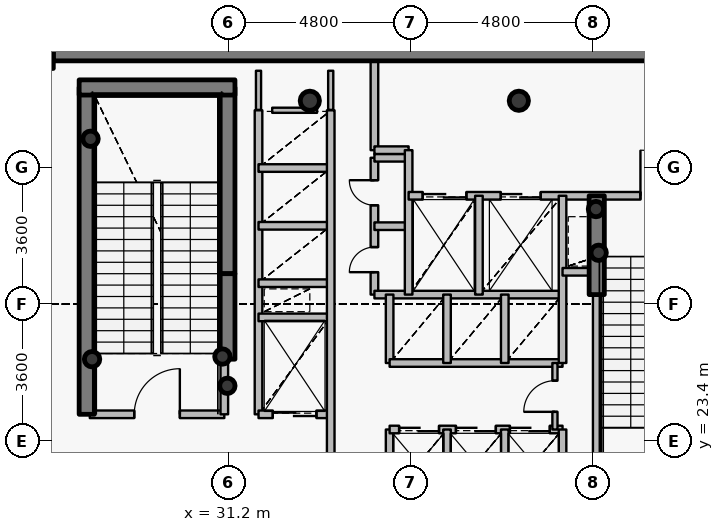
"""IFC4 building model, lengths in metres.
Left out: names, types, materials, properties, quantities, classifications, styles, units other than length and angle.
Written with IfcOpenShell. Run it as: python <this file> out.ifc"""

import sys

from ifc_helpers import new_model, si_unit, direction, frame, frame_2d, origin, origin_2d, place, context, subcontext, project, spatial, rectangle, hollow_circle, extrude, source, transform, mapped, element, fill, save


model = new_model("IFC4")
c1 = context("Model", 3, precision=1e-05, world=origin(), true_north=direction((0.0, 1.0)))
c2 = subcontext(c1, "Body", "Model", "MODEL_VIEW")
j1 = project(units=[si_unit("LENGTHUNIT", "METRE"), si_unit("PLANEANGLEUNIT", "RADIAN")], contexts=[c1])
p1 = place(None, origin())
s1 = spatial("IfcSite", under=j1, at=p1, CompositionType="ELEMENT")
p2 = place(p1, origin())
s2 = spatial("IfcBuilding", under=s1, at=p2, CompositionType="ELEMENT")
p3 = place(p2, frame((0.0, 0.0, 92.4)))
s3 = spatial("IfcBuildingStorey", under=s2, at=p3, CompositionType="ELEMENT", Elevation=92.4)
p4 = place(p3, frame((26.0, 33.8, 0.0), z_axis=(0.0, 0.0, 1.0), x_axis=(1.0, 0.0, 0.0)))
e1 = element("IfcColumn", 1, at=p4, inside=s3, PredefinedType="COLUMN", context=c2, shape_type="SweptSolid", body=[
    extrude(rectangle(XDim=1.2, YDim=1.2, at=origin_2d()), origin(), (0.0, 0.0, 1.0), 4.8),
])
for number, where, z_axis, x_axis in (
    (2, (38.85, 32.35, 0.0), (0.0, 0.0, 1.0), (1.0, 0.0, 0.0)),
    (3, (33.35, 32.35, 0.0), (0.0, 0.0, 1.0), (1.0, 0.0, 0.0)),
):
    element("IfcColumn", number, at=place(p3, frame(where, z_axis=z_axis, x_axis=x_axis)), inside=s3, PredefinedType="COLUMN", context=c2, shape_type="SweptSolid", body=[
        extrude(hollow_circle(Radius=0.254, WallThickness=0.02, at=origin_2d()), origin(), (0.0, 0.0, 1.0), 4.8),
    ])
p5 = place(p3, frame((27.48, 24.1, 0.0), z_axis=(0.0, 0.0, 1.0), x_axis=(0.0, 1.0, 0.0)))
e4 = element("IfcWall", 4, at=p5, inside=s3, PredefinedType="SHEAR", context=c2, shape_type="SweptSolid", body=[
    extrude(rectangle(XDim=8.6, YDim=0.4, at=frame_2d((4.3, 0.0))), origin(), (0.0, 0.0, 1.0), 4.8),
])
p6 = place(p3, frame((31.18, 27.8, 0.0), z_axis=(0.0, 0.0, 1.0), x_axis=(0.0, 1.0, 0.0)))
e5 = element("IfcWall", 5, at=p6, inside=s3, PredefinedType="SHEAR", context=c2, shape_type="SweptSolid", body=[
    extrude(rectangle(XDim=4.9, YDim=0.4, at=frame_2d((2.45, 0.0))), origin(), (0.0, 0.0, 1.0), 4.8),
])
p7 = place(p3, frame((27.28, 32.7, 0.0), z_axis=(0.0, 0.0, 1.0), x_axis=(1.0, 0.0, 0.0)))
e6 = element("IfcWall", 6, at=p7, inside=s3, PredefinedType="SHEAR", context=c2, shape_type="SweptSolid", body=[
    extrude(rectangle(XDim=4.1, YDim=0.4, at=frame_2d((2.05, 0.0))), origin(), (0.0, 0.0, 1.0), 4.8),
])
for number, where, z_axis, x_axis in (
    (7, (27.58, 31.35, 0.0), (0.0, 0.0, 1.0), (1.0, 0.0, 0.0)),
    (8, (31.05, 25.62, 0.0), (0.0, 0.0, 1.0), (1.0, 0.0, 0.0)),
    (9, (31.18, 24.85, 0.0), (0.0, 0.0, 1.0), (1.0, 0.0, 0.0)),
    (10, (27.62, 25.55, 0.0), (0.0, 0.0, 1.0), (1.0, 0.0, 0.0)),
    (11, (40.95, 28.35, 0.0), (0.0, 0.0, 1.0), (1.0, 0.0, 0.0)),
    (12, (40.88, 29.5, 0.0), (0.0, 0.0, 1.0), (1.0, 0.0, 0.0)),
):
    element("IfcColumn", number, at=place(p3, frame(where, z_axis=z_axis, x_axis=x_axis)), inside=s3, PredefinedType="COLUMN", context=c2, shape_type="SweptSolid", body=[
        extrude(hollow_circle(Radius=0.203, WallThickness=0.016, at=origin_2d()), origin(), (0.0, 0.0, 1.0), 4.8),
    ])
p8 = place(p3, frame((26.6, 33.8, 0.0), z_axis=(0.0, 0.0, 1.0), x_axis=(1.0, 0.0, 0.0)))
e13 = element("IfcWall", 13, at=p8, inside=s3, PredefinedType="SHEAR", context=c2, shape_type="SweptSolid", body=[
    extrude(rectangle(XDim=18.8, YDim=0.8, at=frame_2d((9.4, 0.0))), origin(), (0.0, 0.0, 1.0), 4.0),
])
p9 = place(p3, frame((31.18, 25.55, 0.0), z_axis=(0.0, 0.0, 1.0), x_axis=(0.0, 1.0, 0.0)))
e14 = element("IfcWall", 14, at=p9, inside=s3, PredefinedType="SHEAR", context=c2, shape_type="SweptSolid", body=[
    extrude(rectangle(XDim=2.25, YDim=0.4, at=frame_2d((1.125, 0.0))), origin(), (0.0, 0.0, 1.0), 4.15),
])
p10 = place(p3, frame((40.9, 27.25, 0.0), z_axis=(0.0, 0.0, 1.0), x_axis=(0.0, 1.0, 0.0)))
e15 = element("IfcWall", 15, at=p10, inside=s3, PredefinedType="SHEAR", context=c2, shape_type="SweptSolid", body=[
    extrude(rectangle(XDim=2.6, YDim=0.4, at=frame_2d((1.3, 0.0))), origin(), (0.0, 0.0, 1.0), 4.15),
])
p11 = place(p3, frame((27.56, 24.1, 0.0), z_axis=(0.0, 0.0, 1.0), x_axis=(1.0, 0.0, 0.0)))
e16 = element("IfcWall", 16, at=p11, inside=s3, PredefinedType="PARTITIONING", context=c2, shape_type="SweptSolid", body=[
    extrude(rectangle(XDim=3.54, YDim=0.2, at=frame_2d((1.77, 0.0))), origin(), (0.0, 0.0, 1.0), 4.55),
])
p12 = place(p11, frame((1.17, 0.0, 0.0)))
e17 = element("IfcOpeningElement", 17, at=p12, cuts=e16, PredefinedType="OPENING", context=c2, shape_type="SweptSolid", body=[
    extrude(rectangle(XDim=1.2, YDim=2.15, at=origin_2d()), frame((0.6, 0.11, 1.075), z_axis=(0.0, -1.0, 0.0), x_axis=(1.0, 0.0, 0.0)), (0.0, 0.0, 1.0), 0.22),
])
p13 = place(p3, frame((31.1, 24.1, 0.0), z_axis=(0.0, 0.0, 1.0), x_axis=(0.0, 1.0, 0.0)))
e18 = element("IfcWall", 18, at=p13, inside=s3, PredefinedType="PARTITIONING", context=c2, shape_type="SweptSolid", body=[
    extrude(rectangle(XDim=1.44, YDim=0.2, at=frame_2d((0.72, 0.0))), origin(), (0.0, 0.0, 1.0), 4.55),
])
p14 = place(p3, frame((32.0, 24.1, 0.0), z_axis=(0.0, 0.0, 1.0), x_axis=(0.0, 1.0, 0.0)))
e19 = element("IfcWall", 19, at=p14, inside=s3, PredefinedType="PARTITIONING", context=c2, shape_type="SweptSolid", body=[
    extrude(rectangle(XDim=8.0, YDim=0.2, at=frame_2d((4.0, 0.0))), origin(), (0.0, 0.0, 1.0), 4.55),
])
p15 = place(p3, frame((32.0, 24.1, 0.0), z_axis=(0.0, 0.0, 1.0), x_axis=(1.0, 0.0, 0.0)))
e20 = element("IfcWall", 20, at=p15, inside=s3, PredefinedType="PARTITIONING", context=c2, shape_type="SweptSolid", body=[
    extrude(rectangle(XDim=1.9, YDim=0.2, at=frame_2d((0.95, 0.0))), origin(), (0.0, 0.0, 1.0), 4.135),
])
p16 = place(p15, frame((0.375, 0.0, 0.0)))
e21 = element("IfcOpeningElement", 21, at=p16, cuts=e20, PredefinedType="OPENING", context=c2, shape_type="SweptSolid", body=[
    extrude(rectangle(XDim=1.15, YDim=2.15, at=origin_2d()), frame((0.575, 0.11, 1.075), z_axis=(0.0, -1.0, 0.0), x_axis=(1.0, 0.0, 0.0)), (0.0, 0.0, 1.0), 0.22),
])
for number, where, z_axis, x_axis in (
    (22, (32.0, 26.65, 0.0), (0.0, 0.0, 1.0), (1.0, 0.0, 0.0)),
    (23, (32.0, 27.55, 0.0), (0.0, 0.0, 1.0), (1.0, 0.0, 0.0)),
    (24, (32.0, 29.06, 0.0), (0.0, 0.0, 1.0), (1.0, 0.0, 0.0)),
    (25, (32.0, 30.58, 0.0), (0.0, 0.0, 1.0), (1.0, 0.0, 0.0)),
):
    element("IfcWall", number, at=place(p3, frame(where, z_axis=z_axis, x_axis=x_axis)), inside=s3, PredefinedType="PARTITIONING", context=c2, shape_type="SweptSolid", body=[
        extrude(rectangle(XDim=1.9, YDim=0.2, at=frame_2d((0.95, 0.0))), origin(), (0.0, 0.0, 1.0), 4.135),
    ])
p17 = place(p3, frame((33.9, 20.6, 0.0), z_axis=(0.0, 0.0, 1.0), x_axis=(0.0, 1.0, 0.0)))
e26 = element("IfcWall", 26, at=p17, inside=s3, PredefinedType="PARTITIONING", context=c2, shape_type="SweptSolid", body=[
    extrude(rectangle(XDim=11.5, YDim=0.2, at=frame_2d((5.75, 0.0))), origin(), (0.0, 0.0, 1.0), 4.135),
])
p18 = place(p3, frame((35.05, 27.25, 0.0), z_axis=(0.0, 0.0, 1.0), x_axis=(0.0, 1.0, 0.0)))
e27 = element("IfcWall", 27, at=p18, inside=s3, PredefinedType="PARTITIONING", context=c2, shape_type="SweptSolid", body=[
    extrude(rectangle(XDim=3.6, YDim=0.2, at=frame_2d((1.8, 0.0))), origin(), (0.0, 0.0, 1.0), 4.55),
])
p19 = place(p18, frame((0.59, 0.0, 0.0)))
e28 = element("IfcOpeningElement", 28, at=p19, cuts=e27, PredefinedType="OPENING", context=c2, shape_type="SweptSolid", body=[
    extrude(rectangle(XDim=0.66, YDim=2.05, at=origin_2d()), frame((0.33, 0.11, 1.025), z_axis=(0.0, -1.0, 0.0), x_axis=(1.0, 0.0, 0.0)), (0.0, 0.0, 1.0), 0.22),
])
p20 = place(p18, frame((2.35, 0.0, 0.0)))
e29 = element("IfcOpeningElement", 29, at=p20, cuts=e27, PredefinedType="OPENING", context=c2, shape_type="SweptSolid", body=[
    extrude(rectangle(XDim=0.66, YDim=2.05, at=origin_2d()), frame((0.33, 0.11, 1.025), z_axis=(0.0, -1.0, 0.0), x_axis=(1.0, 0.0, 0.0)), (0.0, 0.0, 1.0), 0.22),
])
p21 = place(p3, frame((35.05, 27.25, 0.0), z_axis=(0.0, 0.0, 1.0), x_axis=(1.0, 0.0, 0.0)))
e30 = element("IfcWall", 30, at=p21, inside=s3, PredefinedType="PARTITIONING", context=c2, shape_type="SweptSolid", body=[
    extrude(rectangle(XDim=4.95, YDim=0.2, at=frame_2d((2.475, 0.0))), origin(), (0.0, 0.0, 1.0), 4.135),
])
for number, where, z_axis, x_axis in (
    (31, (35.05, 29.05, 0.0), (0.0, 0.0, 1.0), (1.0, 0.0, 0.0)),
    (32, (35.05, 30.85, 0.0), (0.0, 0.0, 1.0), (1.0, 0.0, 0.0)),
):
    element("IfcWall", number, at=place(p3, frame(where, z_axis=z_axis, x_axis=x_axis)), inside=s3, PredefinedType="PARTITIONING", context=c2, shape_type="SweptSolid", body=[
        extrude(rectangle(XDim=0.9, YDim=0.2, at=frame_2d((0.45, 0.0))), origin(), (0.0, 0.0, 1.0), 4.55),
    ])
p22 = place(p3, frame((35.05, 31.05, 0.0), z_axis=(0.0, 0.0, 1.0), x_axis=(0.0, 1.0, 0.0)))
e33 = element("IfcWall", 33, at=p22, inside=s3, PredefinedType="PARTITIONING", context=c2, shape_type="SweptSolid", body=[
    extrude(rectangle(XDim=2.35, YDim=0.2, at=frame_2d((1.175, 0.0))), origin(), (0.0, 0.0, 1.0), 4.135),
])
p23 = place(p3, frame((35.05, 31.05, 0.0), z_axis=(0.0, 0.0, 1.0), x_axis=(1.0, 0.0, 0.0)))
e34 = element("IfcWall", 34, at=p23, inside=s3, PredefinedType="PARTITIONING", context=c2, shape_type="SweptSolid", body=[
    extrude(rectangle(XDim=0.9, YDim=0.2, at=frame_2d((0.45, 0.0))), origin(), (0.0, 0.0, 1.0), 4.55),
])
p24 = place(p3, frame((35.45, 21.9, 0.0), z_axis=(0.0, 0.0, 1.0), x_axis=(0.0, 1.0, 0.0)))
e35 = element("IfcWall", 35, at=p24, inside=s3, PredefinedType="PARTITIONING", context=c2, shape_type="SweptSolid", body=[
    extrude(rectangle(XDim=1.8, YDim=0.2, at=frame_2d((0.9, 0.0))), origin(), (0.0, 0.0, 1.0), 4.55),
])
p25 = place(p3, frame((35.45, 23.7, 0.0), z_axis=(0.0, 0.0, 1.0), x_axis=(1.0, 0.0, 0.0)))
e36 = element("IfcWall", 36, at=p25, inside=s3, PredefinedType="PARTITIONING", context=c2, shape_type="SweptSolid", body=[
    extrude(rectangle(XDim=4.55, YDim=0.2, at=frame_2d((2.275, 0.0))), origin(), (0.0, 0.0, 1.0), 4.135),
])
p26 = place(p25, frame((0.25, 0.0, 0.0)))
e37 = element("IfcOpeningElement", 37, at=p26, cuts=e36, PredefinedType="OPENING", context=c2, shape_type="SweptSolid", body=[
    extrude(rectangle(XDim=1.05, YDim=2.15, at=origin_2d()), frame((0.525, 0.11, 1.075), z_axis=(0.0, -1.0, 0.0), x_axis=(1.0, 0.0, 0.0)), (0.0, 0.0, 1.0), 0.22),
])
p27 = place(p25, frame((1.745, 0.0, 0.0)))
e38 = element("IfcOpeningElement", 38, at=p27, cuts=e36, PredefinedType="OPENING", context=c2, shape_type="SweptSolid", body=[
    extrude(rectangle(XDim=1.05, YDim=2.15, at=origin_2d()), frame((0.525, 0.11, 1.075), z_axis=(0.0, -1.0, 0.0), x_axis=(1.0, 0.0, 0.0)), (0.0, 0.0, 1.0), 0.22),
])
p28 = place(p25, frame((3.165, 0.0, 0.0)))
e39 = element("IfcOpeningElement", 39, at=p28, cuts=e36, PredefinedType="OPENING", context=c2, shape_type="SweptSolid", body=[
    extrude(rectangle(XDim=1.05, YDim=2.15, at=origin_2d()), frame((0.525, 0.11, 1.075), z_axis=(0.0, -1.0, 0.0), x_axis=(1.0, 0.0, 0.0)), (0.0, 0.0, 1.0), 0.22),
])
p29 = place(p3, frame((35.45, 25.45, 0.0), z_axis=(0.0, 0.0, 1.0), x_axis=(0.0, 1.0, 0.0)))
e40 = element("IfcWall", 40, at=p29, inside=s3, PredefinedType="PARTITIONING", context=c2, shape_type="SweptSolid", body=[
    extrude(rectangle(XDim=1.8, YDim=0.2, at=frame_2d((0.9, 0.0))), origin(), (0.0, 0.0, 1.0), 4.55),
])
p30 = place(p3, frame((35.45, 25.45, 0.0), z_axis=(0.0, 0.0, 1.0), x_axis=(1.0, 0.0, 0.0)))
e41 = element("IfcWall", 41, at=p30, inside=s3, PredefinedType="PARTITIONING", context=c2, shape_type="SweptSolid", body=[
    extrude(rectangle(XDim=4.55, YDim=0.2, at=frame_2d((2.275, 0.0))), origin(), (0.0, 0.0, 1.0), 4.135),
])
p31 = place(p3, frame((35.95, 27.25, 0.0), z_axis=(0.0, 0.0, 1.0), x_axis=(0.0, 1.0, 0.0)))
e42 = element("IfcWall", 42, at=p31, inside=s3, PredefinedType="PARTITIONING", context=c2, shape_type="SweptSolid", body=[
    extrude(rectangle(XDim=3.8, YDim=0.2, at=frame_2d((1.9, 0.0))), origin(), (0.0, 0.0, 1.0), 4.55),
])
p32 = place(p3, frame((35.95, 29.85, 0.0), z_axis=(0.0, 0.0, 1.0), x_axis=(1.0, 0.0, 0.0)))
e43 = element("IfcWall", 43, at=p32, inside=s3, PredefinedType="PARTITIONING", context=c2, shape_type="SweptSolid", body=[
    extrude(rectangle(XDim=8.49, YDim=0.2, at=frame_2d((4.245, 0.0))), origin(), (0.0, 0.0, 1.0), 4.135),
])
p33 = place(p32, frame((6.1, 0.0, 0.0)))
e44 = element("IfcOpeningElement", 44, at=p33, cuts=e43, PredefinedType="OPENING", context=c2, shape_type="SweptSolid", body=[
    extrude(rectangle(XDim=1.2, YDim=2.15, at=origin_2d()), frame((0.6, 0.11, 1.075), z_axis=(0.0, -1.0, 0.0), x_axis=(1.0, 0.0, 0.0)), (0.0, 0.0, 1.0), 0.22),
])
p34 = place(p32, frame((0.37, 0.0, 0.0)))
e45 = element("IfcOpeningElement", 45, at=p34, cuts=e43, PredefinedType="OPENING", context=c2, shape_type="SweptSolid", body=[
    extrude(rectangle(XDim=1.15, YDim=2.15, at=origin_2d()), frame((0.575, 0.11, 1.075), z_axis=(0.0, -1.0, 0.0), x_axis=(1.0, 0.0, 0.0)), (0.0, 0.0, 1.0), 0.22),
])
p35 = place(p32, frame((2.425, 0.0, 0.0)))
e46 = element("IfcOpeningElement", 46, at=p35, cuts=e43, PredefinedType="OPENING", context=c2, shape_type="SweptSolid", body=[
    extrude(rectangle(XDim=1.05, YDim=2.15, at=origin_2d()), frame((0.525, 0.11, 1.075), z_axis=(0.0, -1.0, 0.0), x_axis=(1.0, 0.0, 0.0)), (0.0, 0.0, 1.0), 0.22),
])
for number, where, z_axis, x_axis in (
    (47, (36.96, 21.9, 0.0), (0.0, 0.0, 1.0), (0.0, 1.0, 0.0)),
    (48, (36.96, 25.45, 0.0), (0.0, 0.0, 1.0), (0.0, 1.0, 0.0)),
):
    element("IfcWall", number, at=place(p3, frame(where, z_axis=z_axis, x_axis=x_axis)), inside=s3, PredefinedType="PARTITIONING", context=c2, shape_type="SweptSolid", body=[
        extrude(rectangle(XDim=1.8, YDim=0.2, at=frame_2d((0.9, 0.0))), origin(), (0.0, 0.0, 1.0), 4.55),
    ])
p36 = place(p3, frame((37.8, 27.25, 0.0), z_axis=(0.0, 0.0, 1.0), x_axis=(0.0, 1.0, 0.0)))
e49 = element("IfcWall", 49, at=p36, inside=s3, PredefinedType="PARTITIONING", context=c2, shape_type="SweptSolid", body=[
    extrude(rectangle(XDim=2.6, YDim=0.2, at=frame_2d((1.3, 0.0))), origin(), (0.0, 0.0, 1.0), 4.55),
])
for number, where, z_axis, x_axis in (
    (50, (38.48, 21.9, 0.0), (0.0, 0.0, 1.0), (0.0, 1.0, 0.0)),
    (51, (38.48, 25.45, 0.0), (0.0, 0.0, 1.0), (0.0, 1.0, 0.0)),
):
    element("IfcWall", number, at=place(p3, frame(where, z_axis=z_axis, x_axis=x_axis)), inside=s3, PredefinedType="PARTITIONING", context=c2, shape_type="SweptSolid", body=[
        extrude(rectangle(XDim=1.8, YDim=0.2, at=frame_2d((0.9, 0.0))), origin(), (0.0, 0.0, 1.0), 4.55),
    ])
p37 = place(p3, frame((39.8, 23.7, 0.0), z_axis=(0.0, 0.0, 1.0), x_axis=(0.0, 1.0, 0.0)))
e52 = element("IfcWall", 52, at=p37, inside=s3, PredefinedType="PARTITIONING", context=c2, shape_type="SweptSolid", body=[
    extrude(rectangle(XDim=1.75, YDim=0.135, at=frame_2d((0.875, 0.0))), origin(), (0.0, 0.0, 1.0), 4.55),
])
p38 = place(p37, frame((0.465, 0.0, 0.0)))
e53 = element("IfcOpeningElement", 53, at=p38, cuts=e52, PredefinedType="OPENING", context=c2, shape_type="SweptSolid", body=[
    extrude(rectangle(XDim=0.82, YDim=2.1, at=origin_2d()), frame((0.41, 0.078, 1.05), z_axis=(0.0, -1.0, 0.0), x_axis=(1.0, 0.0, 0.0)), (0.0, 0.0, 1.0), 0.155),
])
p39 = place(p3, frame((40.0, 21.9, 0.0), z_axis=(0.0, 0.0, 1.0), x_axis=(0.0, 1.0, 0.0)))
e54 = element("IfcWall", 54, at=p39, inside=s3, PredefinedType="PARTITIONING", context=c2, shape_type="SweptSolid", body=[
    extrude(rectangle(XDim=1.8, YDim=0.2, at=frame_2d((0.9, 0.0))), origin(), (0.0, 0.0, 1.0), 4.55),
])
p40 = place(p3, frame((40.0, 25.45, 0.0), z_axis=(0.0, 0.0, 1.0), x_axis=(0.0, 1.0, 0.0)))
e55 = element("IfcWall", 55, at=p40, inside=s3, PredefinedType="PARTITIONING", context=c2, shape_type="SweptSolid", body=[
    extrude(rectangle(XDim=4.4, YDim=0.2, at=frame_2d((2.2, 0.0))), origin(), (0.0, 0.0, 1.0), 4.55),
])
p41 = place(p3, frame((40.0, 27.85, 0.0), z_axis=(0.0, 0.0, 1.0), x_axis=(1.0, 0.0, 0.0)))
e56 = element("IfcWall", 56, at=p41, inside=s3, PredefinedType="PARTITIONING", context=c2, shape_type="SweptSolid", body=[
    extrude(rectangle(XDim=0.9, YDim=0.2, at=frame_2d((0.45, 0.0))), origin(), (0.0, 0.0, 1.0), 4.55),
])
p42 = place(p3, frame((40.9, 21.33, 0.0), z_axis=(0.0, 0.0, 1.0), x_axis=(0.0, 1.0, 0.0)))
e57 = element("IfcWall", 57, at=p42, inside=s3, PredefinedType="PARTITIONING", context=c2, shape_type="SweptSolid", body=[
    extrude(rectangle(XDim=5.91, YDim=0.2, at=frame_2d((2.955, 0.0))), origin(), (0.0, 0.0, 1.0), 4.085),
])
p43 = place(p3, frame((32.36, 32.1, 0.0), z_axis=(0.0, 0.0, 1.0), x_axis=(1.0, 0.0, 0.0)))
e58 = element("IfcWall", 58, at=p43, inside=s3, PredefinedType="PARTITIONING", context=c2, shape_type="SweptSolid", body=[
    extrude(rectangle(XDim=1.18, YDim=0.135, at=frame_2d((0.59, 0.0))), origin(), (0.0, 0.0, 1.0), 4.135),
])
p44 = place(p3, frame((32.0, 33.14, 0.0), z_axis=(0.0, 0.0, 1.0), x_axis=(0.0, -1.0, 0.0)))
e59 = element("IfcWall", 59, at=p44, inside=s3, PredefinedType="PARTITIONING", context=c2, shape_type="SweptSolid", body=[
    extrude(rectangle(XDim=1.03, YDim=0.135, at=frame_2d((0.515, 0.0))), origin(), (0.0, 0.0, 1.0), 4.085),
])
p45 = place(p3, frame((33.9, 32.11, 0.0), z_axis=(0.0, 0.0, 1.0), x_axis=(0.0, 1.0, 0.0)))
e60 = element("IfcWall", 60, at=p45, inside=s3, PredefinedType="PARTITIONING", context=c2, shape_type="SweptSolid", body=[
    extrude(rectangle(XDim=1.03, YDim=0.135, at=frame_2d((0.515, 0.0))), origin(), (0.0, 0.0, 1.0), 4.135),
])
m1 = source(origin(), c2, "Body", "SweptSolid", [
    extrude(rectangle(XDim=1.2, YDim=2.15, at=origin_2d()), frame((0.6, 0.025, 1.075), z_axis=(0.0, -1.0, 0.0), x_axis=(1.0, 0.0, 0.0)), (0.0, 0.0, 1.0), 0.05),
])
p46 = place(p12, origin())
e61 = element("IfcDoor", 61, at=p46, inside=s3, OperationType="SINGLE_SWING_RIGHT", PredefinedType="DOOR", context=c2, shape_type="MappedRepresentation", body=[
    mapped(m1, transform((0.0, 0.0, 0.0), x_axis=(1.0, 0.0, 0.0), y_axis=(0.0, 1.0, 0.0), z_axis=(0.0, 0.0, 1.0), scale=1.0)),
])
fill(e17, e61)
p47 = place(p33, origin())
e62 = element("IfcDoor", 62, at=p47, inside=s3, OperationType="SINGLE_SWING_LEFT", PredefinedType="DOOR", context=c2, shape_type="MappedRepresentation", body=[
    mapped(m1, transform((0.0, 0.0, 0.0), x_axis=(1.0, 0.0, 0.0), y_axis=(0.0, 1.0, 0.0), z_axis=(0.0, 0.0, 1.0), scale=1.0)),
])
fill(e44, e62)
m2 = source(origin(), c2, "Body", "SweptSolid", [
    extrude(rectangle(XDim=1.15, YDim=2.15, at=origin_2d()), frame((0.575, 0.025, 1.075), z_axis=(0.0, -1.0, 0.0), x_axis=(1.0, 0.0, 0.0)), (0.0, 0.0, 1.0), 0.05),
])
p48 = place(p34, origin())
e63 = element("IfcDoor", 63, at=p48, inside=s3, OperationType="DOUBLE_DOOR_SLIDING", PredefinedType="USERDEFINED", context=c2, shape_type="MappedRepresentation", body=[
    mapped(m2, transform((0.0, 0.0, 0.0), x_axis=(1.0, 0.0, 0.0), y_axis=(0.0, 1.0, 0.0), z_axis=(0.0, 0.0, 1.0), scale=1.0)),
])
fill(e45, e63)
p49 = place(p16, origin())
e64 = element("IfcDoor", 64, at=p49, inside=s3, OperationType="DOUBLE_DOOR_SLIDING", PredefinedType="USERDEFINED", context=c2, shape_type="MappedRepresentation", body=[
    mapped(m2, transform((0.0, 0.0, 0.0), x_axis=(1.0, 0.0, 0.0), y_axis=(0.0, 1.0, 0.0), z_axis=(0.0, 0.0, 1.0), scale=1.0)),
])
fill(e21, e64)
m3 = source(origin(), c2, "Body", "SweptSolid", [
    extrude(rectangle(XDim=1.05, YDim=2.15, at=origin_2d()), frame((0.525, 0.025, 1.075), z_axis=(0.0, -1.0, 0.0), x_axis=(1.0, 0.0, 0.0)), (0.0, 0.0, 1.0), 0.05),
])
p50 = place(p35, origin())
e65 = element("IfcDoor", 65, at=p50, inside=s3, OperationType="DOUBLE_DOOR_SLIDING", PredefinedType="USERDEFINED", context=c2, shape_type="MappedRepresentation", body=[
    mapped(m3, transform((0.0, 0.0, 0.0), x_axis=(1.0, 0.0, 0.0), y_axis=(0.0, 1.0, 0.0), z_axis=(0.0, 0.0, 1.0), scale=1.0)),
])
fill(e46, e65)
p51 = place(p26, origin())
e66 = element("IfcDoor", 66, at=p51, inside=s3, OperationType="DOUBLE_DOOR_SLIDING", PredefinedType="USERDEFINED", context=c2, shape_type="MappedRepresentation", body=[
    mapped(m3, transform((0.0, 0.0, 0.0), x_axis=(1.0, 0.0, 0.0), y_axis=(0.0, 1.0, 0.0), z_axis=(0.0, 0.0, 1.0), scale=1.0)),
])
fill(e37, e66)
p52 = place(p27, origin())
e67 = element("IfcDoor", 67, at=p52, inside=s3, OperationType="DOUBLE_DOOR_SLIDING", PredefinedType="USERDEFINED", context=c2, shape_type="MappedRepresentation", body=[
    mapped(m3, transform((0.0, 0.0, 0.0), x_axis=(1.0, 0.0, 0.0), y_axis=(0.0, 1.0, 0.0), z_axis=(0.0, 0.0, 1.0), scale=1.0)),
])
fill(e38, e67)
p53 = place(p28, origin())
e68 = element("IfcDoor", 68, at=p53, inside=s3, OperationType="DOUBLE_DOOR_SLIDING", PredefinedType="USERDEFINED", context=c2, shape_type="MappedRepresentation", body=[
    mapped(m3, transform((0.0, 0.0, 0.0), x_axis=(1.0, 0.0, 0.0), y_axis=(0.0, 1.0, 0.0), z_axis=(0.0, 0.0, 1.0), scale=1.0)),
])
fill(e39, e68)
m4 = source(origin(), c2, "Body", "SweptSolid", [
    extrude(rectangle(XDim=0.66, YDim=2.05, at=origin_2d()), frame((0.33, 0.025, 1.025), z_axis=(0.0, -1.0, 0.0), x_axis=(1.0, 0.0, 0.0)), (0.0, 0.0, 1.0), 0.05),
])
p54 = place(p19, origin())
e69 = element("IfcDoor", 69, at=p54, inside=s3, OperationType="SINGLE_SWING_LEFT", PredefinedType="USERDEFINED", context=c2, shape_type="MappedRepresentation", body=[
    mapped(m4, transform((0.0, 0.0, 0.0), x_axis=(1.0, 0.0, 0.0), y_axis=(0.0, 1.0, 0.0), z_axis=(0.0, 0.0, 1.0), scale=1.0)),
])
fill(e28, e69)
p55 = place(p20, origin())
e70 = element("IfcDoor", 70, at=p55, inside=s3, OperationType="SINGLE_SWING_RIGHT", PredefinedType="USERDEFINED", context=c2, shape_type="MappedRepresentation", body=[
    mapped(m4, transform((0.0, 0.0, 0.0), x_axis=(1.0, 0.0, 0.0), y_axis=(0.0, 1.0, 0.0), z_axis=(0.0, 0.0, 1.0), scale=1.0)),
])
fill(e29, e70)
m5 = source(origin(), c2, "Body", "SweptSolid", [
    extrude(rectangle(XDim=0.82, YDim=2.1, at=origin_2d()), frame((0.41, 0.025, 1.05), z_axis=(0.0, -1.0, 0.0), x_axis=(1.0, 0.0, 0.0)), (0.0, 0.0, 1.0), 0.05),
])
p56 = place(p38, origin())
e71 = element("IfcDoor", 71, at=p56, inside=s3, OperationType="SINGLE_SWING_LEFT", PredefinedType="DOOR", context=c2, shape_type="MappedRepresentation", body=[
    mapped(m5, transform((0.0, 0.0, 0.0), x_axis=(1.0, 0.0, 0.0), y_axis=(0.0, 1.0, 0.0), z_axis=(0.0, 0.0, 1.0), scale=1.0)),
])
fill(e53, e71)
save(model, sys.argv[1])
